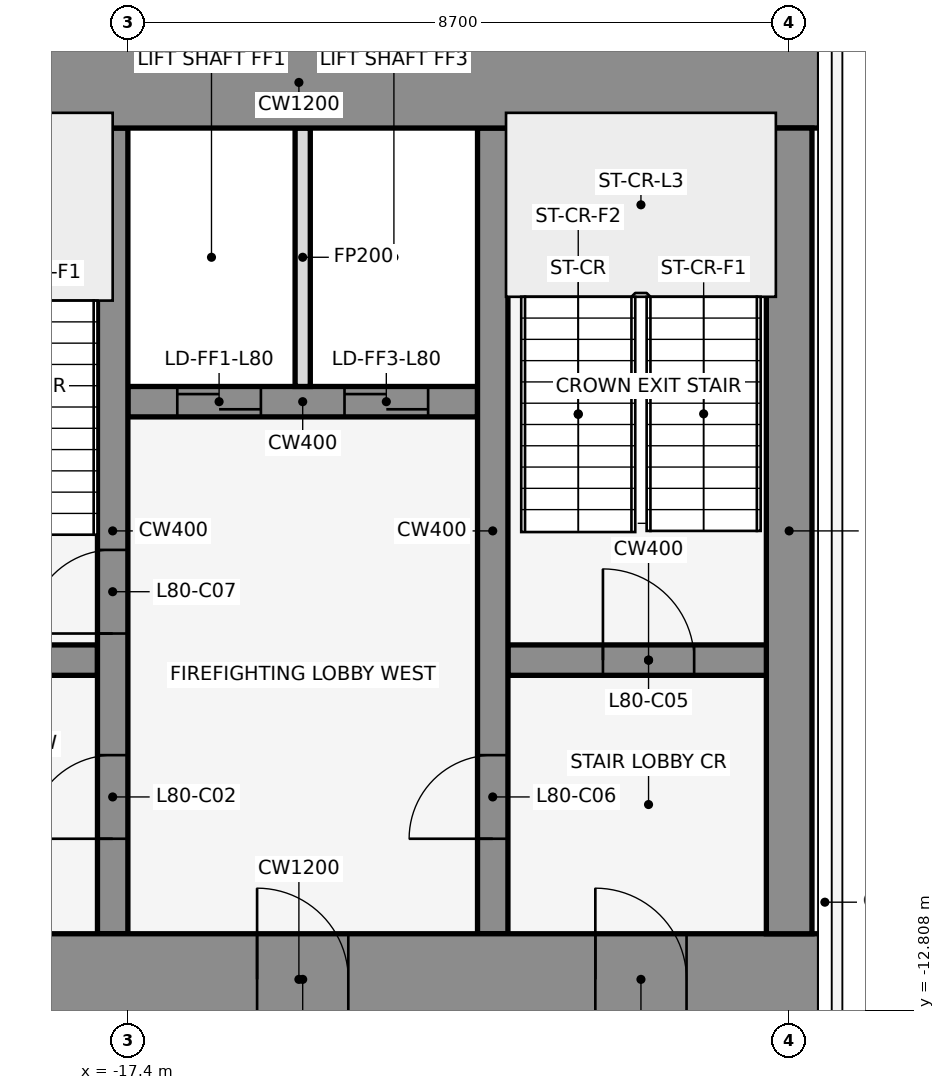
"""IFC4 building model, lengths in metres.
Left out: names, types, materials, properties, quantities, classifications, styles, units other than length and angle.
Written with IfcOpenShell. Run it as: python <this file> out.ifc"""

import sys

from ifc_helpers import new_model, si_unit, direction, frame, frame_2d, origin, place, context, subcontext, project, spatial, rectangle, extrude, element, fill, save


model = new_model("IFC4")
c1 = context("Model", 3, precision=1e-05, world=origin(), true_north=direction((0.0, 1.0)))
c2 = subcontext(c1, "Body", "Model", "MODEL_VIEW")
j1 = project(units=[si_unit("LENGTHUNIT", "METRE"), si_unit("PLANEANGLEUNIT", "RADIAN")], contexts=[c1])
p1 = place(None, origin())
s1 = spatial("IfcSite", under=j1, at=p1, CompositionType="ELEMENT")
p2 = place(p1, origin())
s2 = spatial("IfcBuilding", under=s1, at=p2, CompositionType="ELEMENT")
p3 = place(p2, frame((0.0, 0.0, 356.9)))
s3 = spatial("IfcBuildingStorey", under=s2, at=p3, CompositionType="ELEMENT", Elevation=356.9)
p4 = place(p3, frame((-20.8, -8.2, 0.0), z_axis=(0.0, 0.0, 1.0), x_axis=(1.0, 0.0, 0.0)))
e1 = element("IfcWall", 1, at=p4, inside=s3, PredefinedType="SHEAR", context=c2, shape_type="SweptSolid", body=[
    extrude(rectangle(XDim=3.0, YDim=0.4, at=frame_2d((1.5, 0.0))), origin(), (0.0, 0.0, 1.0), 4.5),
])
p5 = place(p4, frame((0.85, 0.0, 0.0)))
e2 = element("IfcOpeningElement", 2, at=p5, cuts=e1, PredefinedType="OPENING", context=c2, shape_type="SweptSolid", body=[
    extrude(rectangle(XDim=1.2, YDim=2.1, at=frame_2d((0.6, 1.05))), frame((0.0, 0.212, 0.0), z_axis=(0.0, -1.0, 0.0), x_axis=(1.0, 0.0, 0.0)), (0.0, 0.0, 1.0), 0.424),
])
p6 = place(p3, frame((-12.4, -8.2, 0.0), z_axis=(0.0, 0.0, 1.0), x_axis=(1.0, 0.0, 0.0)))
e3 = element("IfcWall", 3, at=p6, inside=s3, PredefinedType="SHEAR", context=c2, shape_type="SweptSolid", body=[
    extrude(rectangle(XDim=3.7, YDim=0.4, at=frame_2d((1.85, 0.0))), origin(), (0.0, 0.0, 1.0), 4.5),
])
p7 = place(p6, frame((1.25, 0.0, 0.0)))
e4 = element("IfcOpeningElement", 4, at=p7, cuts=e3, PredefinedType="OPENING", context=c2, shape_type="SweptSolid", body=[
    extrude(rectangle(XDim=1.2, YDim=2.1, at=frame_2d((0.6, 1.05))), frame((0.0, 0.212, 0.0), z_axis=(0.0, -1.0, 0.0), x_axis=(1.0, 0.0, 0.0)), (0.0, 0.0, 1.0), 0.424),
])
p8 = place(p3, frame((-17.4, -4.8, 0.0), z_axis=(0.0, 0.0, 1.0), x_axis=(1.0, 0.0, 0.0)))
e5 = element("IfcWall", 5, at=p8, inside=s3, PredefinedType="SHEAR", context=c2, shape_type="SweptSolid", body=[
    extrude(rectangle(XDim=4.6, YDim=0.4, at=frame_2d((2.3, 0.0))), origin(), (0.0, 0.0, 1.0), 4.5),
])
p9 = place(p8, frame((0.65, 0.0, 0.0)))
e6 = element("IfcOpeningElement", 6, at=p9, cuts=e5, PredefinedType="OPENING", context=c2, shape_type="SweptSolid", body=[
    extrude(rectangle(XDim=1.1, YDim=2.1, at=frame_2d((0.55, 1.05))), frame((0.0, 0.212, 0.0), z_axis=(0.0, -1.0, 0.0), x_axis=(1.0, 0.0, 0.0)), (0.0, 0.0, 1.0), 0.424),
])
p10 = place(p8, frame((2.85, 0.0, 0.0)))
e7 = element("IfcOpeningElement", 7, at=p10, cuts=e5, PredefinedType="OPENING", context=c2, shape_type="SweptSolid", body=[
    extrude(rectangle(XDim=1.1, YDim=2.1, at=frame_2d((0.55, 1.05))), frame((0.0, 0.212, 0.0), z_axis=(0.0, -1.0, 0.0), x_axis=(1.0, 0.0, 0.0)), (0.0, 0.0, 1.0), 0.424),
])
p11 = place(p3, frame((-17.6, -11.8, 0.0), z_axis=(0.0, 0.0, 1.0), x_axis=(0.0, 1.0, 0.0)))
e8 = element("IfcWall", 8, at=p11, inside=s3, PredefinedType="SHEAR", context=c2, shape_type="SweptSolid", body=[
    extrude(rectangle(XDim=10.6, YDim=0.4, at=frame_2d((5.3, 0.0))), origin(), (0.0, 0.0, 1.0), 4.5),
])
p12 = place(p11, frame((1.25, 0.0, 0.0)))
e9 = element("IfcOpeningElement", 9, at=p12, cuts=e8, PredefinedType="OPENING", context=c2, shape_type="SweptSolid", body=[
    extrude(rectangle(XDim=1.1, YDim=2.1, at=frame_2d((0.55, 1.05))), frame((0.0, 0.212, 0.0), z_axis=(0.0, -1.0, 0.0), x_axis=(1.0, 0.0, 0.0)), (0.0, 0.0, 1.0), 0.424),
])
p13 = place(p11, frame((3.95, 0.0, 0.0)))
e10 = element("IfcOpeningElement", 10, at=p13, cuts=e8, PredefinedType="OPENING", context=c2, shape_type="SweptSolid", body=[
    extrude(rectangle(XDim=1.1, YDim=2.1, at=frame_2d((0.55, 1.05))), frame((0.0, 0.212, 0.0), z_axis=(0.0, -1.0, 0.0), x_axis=(1.0, 0.0, 0.0)), (0.0, 0.0, 1.0), 0.424),
])
p14 = place(p3, frame((-15.1, -4.6, 0.0), z_axis=(0.0, 0.0, 1.0), x_axis=(0.0, 1.0, 0.0)))
e11 = element("IfcWall", 11, at=p14, inside=s3, PredefinedType="PARTITIONING", context=c2, shape_type="SweptSolid", body=[
    extrude(rectangle(XDim=3.4, YDim=0.2, at=frame_2d((1.7, 0.0))), origin(), (0.0, 0.0, 1.0), 3.368),
])
p15 = place(p3, frame((-12.6, -11.8, 0.0), z_axis=(0.0, 0.0, 1.0), x_axis=(0.0, 1.0, 0.0)))
e12 = element("IfcWall", 12, at=p15, inside=s3, PredefinedType="SHEAR", context=c2, shape_type="SweptSolid", body=[
    extrude(rectangle(XDim=10.6, YDim=0.4, at=frame_2d((5.3, 0.0))), origin(), (0.0, 0.0, 1.0), 4.5),
])
p16 = place(p15, frame((1.25, 0.0, 0.0)))
e13 = element("IfcOpeningElement", 13, at=p16, cuts=e12, PredefinedType="OPENING", context=c2, shape_type="SweptSolid", body=[
    extrude(rectangle(XDim=1.1, YDim=2.1, at=frame_2d((0.55, 1.05))), frame((0.0, 0.212, 0.0), z_axis=(0.0, -1.0, 0.0), x_axis=(1.0, 0.0, 0.0)), (0.0, 0.0, 1.0), 0.424),
])
p17 = place(p3, frame((-22.0, -0.6, 0.0), z_axis=(0.0, 0.0, 1.0), x_axis=(1.0, 0.0, 0.0)))
e14 = element("IfcWall", 14, at=p17, inside=s3, PredefinedType="SHEAR", context=c2, shape_type="SweptSolid", body=[
    extrude(rectangle(XDim=13.7, YDim=1.2, at=frame_2d((6.85, 0.0))), origin(), (0.0, 0.0, 1.0), 4.5),
])
p18 = place(p3, frame((-22.0, -12.4, 0.0), z_axis=(0.0, 0.0, 1.0), x_axis=(1.0, 0.0, 0.0)))
e15 = element("IfcWall", 15, at=p18, inside=s3, PredefinedType="SHEAR", context=c2, shape_type="SweptSolid", body=[
    extrude(rectangle(XDim=13.7, YDim=1.2, at=frame_2d((6.85, 0.0))), origin(), (0.0, 0.0, 1.0), 4.5),
])
p19 = place(p18, frame((2.2, 0.0, 0.0)))
e16 = element("IfcOpeningElement", 16, at=p19, cuts=e15, PredefinedType="OPENING", context=c2, shape_type="SweptSolid", body=[
    extrude(rectangle(XDim=1.2, YDim=2.1, at=frame_2d((0.6, 1.05))), frame((0.0, 0.612, 0.0), z_axis=(0.0, -1.0, 0.0), x_axis=(1.0, 0.0, 0.0)), (0.0, 0.0, 1.0), 1.224),
])
p20 = place(p18, frame((10.75, 0.0, 0.0)))
e17 = element("IfcOpeningElement", 17, at=p20, cuts=e15, PredefinedType="OPENING", context=c2, shape_type="SweptSolid", body=[
    extrude(rectangle(XDim=1.2, YDim=2.1, at=frame_2d((0.6, 1.05))), frame((0.0, 0.612, 0.0), z_axis=(0.0, -1.0, 0.0), x_axis=(1.0, 0.0, 0.0)), (0.0, 0.0, 1.0), 1.224),
])
p21 = place(p18, frame((6.3, 0.0, 0.0)))
e18 = element("IfcOpeningElement", 18, at=p21, cuts=e15, PredefinedType="OPENING", context=c2, shape_type="SweptSolid", body=[
    extrude(rectangle(XDim=1.2, YDim=2.1, at=frame_2d((0.6, 1.05))), frame((0.0, 0.612, 0.0), z_axis=(0.0, -1.0, 0.0), x_axis=(1.0, 0.0, 0.0)), (0.0, 0.0, 1.0), 1.224),
])
p22 = place(p3, frame((-8.7, -11.8, 0.0), z_axis=(0.0, 0.0, 1.0), x_axis=(0.0, 1.0, 0.0)))
e19 = element("IfcWall", 19, at=p22, inside=s3, PredefinedType="SHEAR", context=c2, shape_type="SweptSolid", body=[
    extrude(rectangle(XDim=10.6, YDim=0.6, at=frame_2d((5.3, 0.0))), origin(), (0.0, 0.0, 1.0), 4.5),
])
p23 = place(p12, frame((1.1, 0.0, 0.0), z_axis=(0.0, 0.0, 1.0), x_axis=(-1.0, 0.0, 0.0)))
e20 = element("IfcDoor", 20, at=p23, inside=s3, OperationType="SINGLE_SWING_LEFT", PredefinedType="DOOR", context=c2, shape_type="SweptSolid", body=[
    extrude(rectangle(XDim=1.1, YDim=2.1, at=frame_2d((0.55, 1.05))), frame((0.0, 0.025, 0.0), z_axis=(0.0, -1.0, 0.0), x_axis=(1.0, 0.0, 0.0)), (0.0, 0.0, 1.0), 0.05),
])
fill(e9, e20)
p24 = place(p7, origin())
e21 = element("IfcDoor", 21, at=p24, inside=s3, OperationType="SINGLE_SWING_LEFT", PredefinedType="DOOR", context=c2, shape_type="SweptSolid", body=[
    extrude(rectangle(XDim=1.2, YDim=2.1, at=frame_2d((0.6, 1.05))), frame((0.0, 0.025, 0.0), z_axis=(0.0, -1.0, 0.0), x_axis=(1.0, 0.0, 0.0)), (0.0, 0.0, 1.0), 0.05),
])
fill(e4, e21)
p25 = place(p16, origin())
e22 = element("IfcDoor", 22, at=p25, inside=s3, OperationType="SINGLE_SWING_RIGHT", PredefinedType="DOOR", context=c2, shape_type="SweptSolid", body=[
    extrude(rectangle(XDim=1.1, YDim=2.1, at=frame_2d((0.55, 1.05))), frame((0.0, 0.025, 0.0), z_axis=(0.0, -1.0, 0.0), x_axis=(1.0, 0.0, 0.0)), (0.0, 0.0, 1.0), 0.05),
])
fill(e13, e22)
p26 = place(p9, origin())
e23 = element("IfcDoor", 23, at=p26, inside=s3, OperationType="DOUBLE_DOOR_SLIDING", PredefinedType="DOOR", context=c2, shape_type="SweptSolid", body=[
    extrude(rectangle(XDim=1.1, YDim=2.1, at=frame_2d((0.55, 1.05))), frame((0.0, 0.025, 0.0), z_axis=(0.0, -1.0, 0.0), x_axis=(1.0, 0.0, 0.0)), (0.0, 0.0, 1.0), 0.05),
])
fill(e6, e23)
p27 = place(p10, origin())
e24 = element("IfcDoor", 24, at=p27, inside=s3, OperationType="DOUBLE_DOOR_SLIDING", PredefinedType="DOOR", context=c2, shape_type="SweptSolid", body=[
    extrude(rectangle(XDim=1.1, YDim=2.1, at=frame_2d((0.55, 1.05))), frame((0.0, 0.025, 0.0), z_axis=(0.0, -1.0, 0.0), x_axis=(1.0, 0.0, 0.0)), (0.0, 0.0, 1.0), 0.05),
])
fill(e7, e24)
p28 = place(p13, frame((1.1, 0.0, 0.0), z_axis=(0.0, 0.0, 1.0), x_axis=(-1.0, 0.0, 0.0)))
e25 = element("IfcDoor", 25, at=p28, inside=s3, OperationType="SINGLE_SWING_RIGHT", PredefinedType="DOOR", context=c2, shape_type="SweptSolid", body=[
    extrude(rectangle(XDim=1.1, YDim=2.1, at=frame_2d((0.55, 1.05))), frame((0.0, 0.025, 0.0), z_axis=(0.0, -1.0, 0.0), x_axis=(1.0, 0.0, 0.0)), (0.0, 0.0, 1.0), 0.05),
])
fill(e10, e25)
p29 = place(p20, frame((1.2, 0.0, 0.0), z_axis=(0.0, 0.0, 1.0), x_axis=(-1.0, 0.0, 0.0)))
e26 = element("IfcDoor", 26, at=p29, inside=s3, OperationType="SINGLE_SWING_RIGHT", PredefinedType="DOOR", context=c2, shape_type="SweptSolid", body=[
    extrude(rectangle(XDim=1.2, YDim=2.1, at=frame_2d((0.6, 1.05))), frame((0.0, 0.025, 0.0), z_axis=(0.0, -1.0, 0.0), x_axis=(1.0, 0.0, 0.0)), (0.0, 0.0, 1.0), 0.05),
])
fill(e17, e26)
p30 = place(p21, frame((1.2, 0.0, 0.0), z_axis=(0.0, 0.0, 1.0), x_axis=(-1.0, 0.0, 0.0)))
e27 = element("IfcDoor", 27, at=p30, inside=s3, OperationType="SINGLE_SWING_RIGHT", PredefinedType="DOOR", context=c2, shape_type="SweptSolid", body=[
    extrude(rectangle(XDim=1.2, YDim=2.1, at=frame_2d((0.6, 1.05))), frame((0.0, 0.025, 0.0), z_axis=(0.0, -1.0, 0.0), x_axis=(1.0, 0.0, 0.0)), (0.0, 0.0, 1.0), 0.05),
])
fill(e18, e27)
save(model, sys.argv[1])
